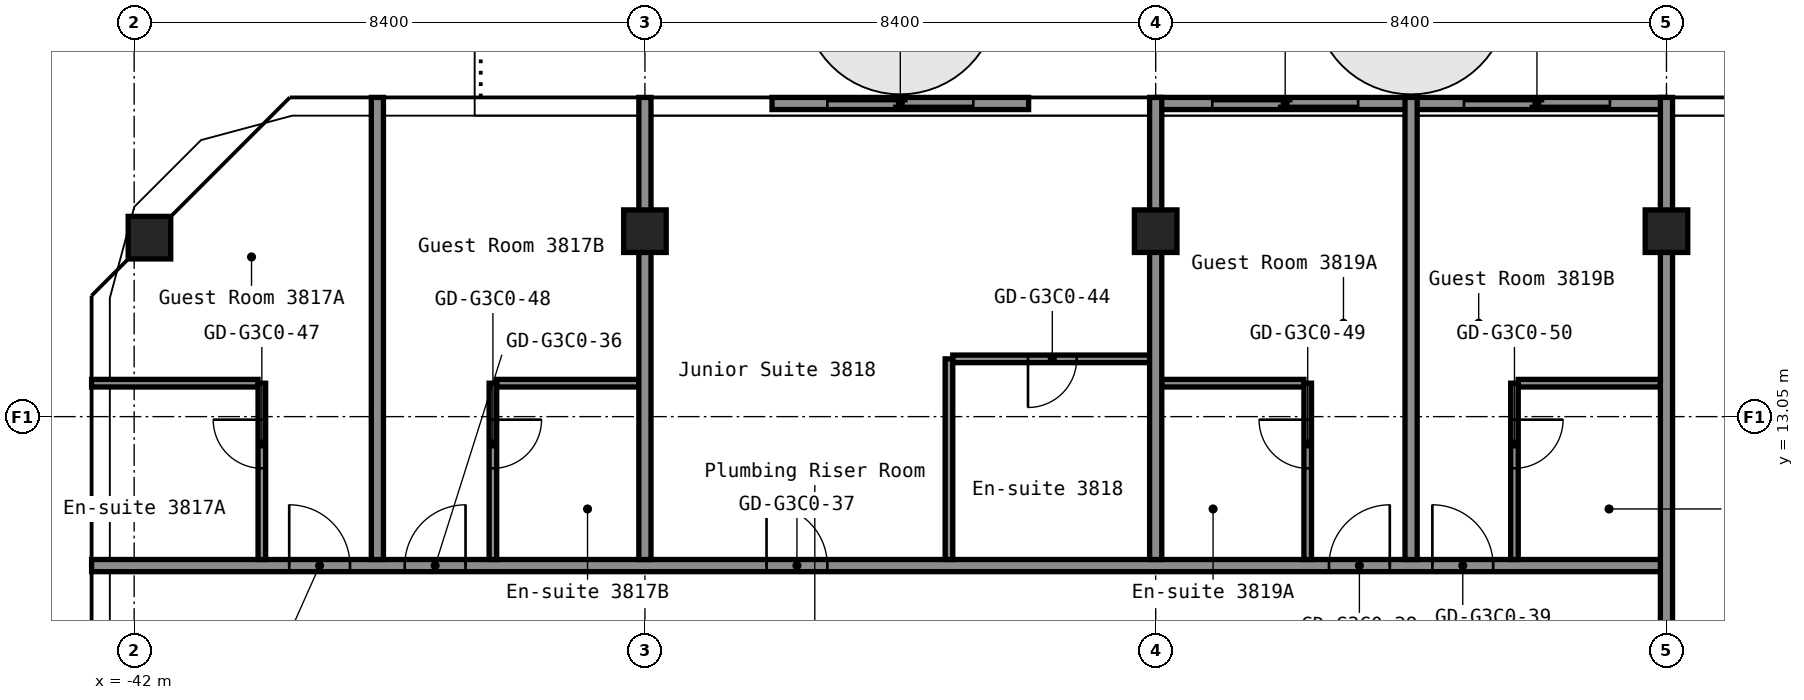
"""IFC4 building model, lengths in metres.
Left out: names, types, materials, properties, quantities, classifications, styles, units other than length and angle.
Written with IfcOpenShell. Run it as: python <this file> out.ifc"""

import sys

from ifc_helpers import new_model, si_unit, direction, frame, frame_2d, origin, origin_2d, place, context, subcontext, project, spatial, rectangle, hollow_rectangle, extrude, element, fill, save


model = new_model("IFC4")
c1 = context("Model", 3, precision=1e-05, world=origin(), true_north=direction((0.0, 1.0)))
c2 = subcontext(c1, "Body", "Model", "MODEL_VIEW")
j1 = project(units=[si_unit("LENGTHUNIT", "METRE"), si_unit("PLANEANGLEUNIT", "RADIAN")], contexts=[c1])
p1 = place(None, origin())
s1 = spatial("IfcSite", under=j1, at=p1, CompositionType="ELEMENT")
p2 = place(p1, origin())
s2 = spatial("IfcBuilding", under=s1, at=p2, CompositionType="ELEMENT")
p3 = place(p2, frame((0.0, 0.0, 137.4)))
s3 = spatial("IfcBuildingStorey", under=s2, at=p3, CompositionType="ELEMENT", Elevation=137.4)
for number, where, z_axis, x_axis in (
    (1, (-41.749, 15.994, 0.0), (0.0, 0.0, 1.0), (1.0, 0.0, 0.0)),
    (2, (-33.6, 16.1, 0.0), (0.0, 0.0, 1.0), (1.0, 0.0, 0.0)),
    (3, (-25.2, 16.1, 0.0), (0.0, 0.0, 1.0), (1.0, 0.0, 0.0)),
    (4, (-16.8, 16.1, 0.0), (0.0, 0.0, 1.0), (1.0, 0.0, 0.0)),
):
    element("IfcColumn", number, at=place(p3, frame(where, z_axis=z_axis, x_axis=x_axis)), inside=s3, PredefinedType="COLUMN", context=c2, shape_type="SweptSolid", body=[
        extrude(hollow_rectangle(XDim=0.7, YDim=0.7, WallThickness=0.028, at=origin_2d()), origin(), (0.0, 0.0, 1.0), 2.75),
    ])
p4 = place(p3, frame((-42.7, 10.6, 0.0), z_axis=(0.0, 0.0, 1.0), x_axis=(1.0, 0.0, 0.0)))
e5 = element("IfcWall", 5, at=p4, inside=s3, PredefinedType="PARTITIONING", context=c2, shape_type="SweptSolid", body=[
    extrude(rectangle(XDim=25.9, YDim=0.2, at=frame_2d((12.95, 0.0))), origin(), (0.0, 0.0, 1.0), 2.75),
])
p5 = place(p4, frame((3.25, 0.0, 0.0)))
e6 = element("IfcOpeningElement", 6, at=p5, cuts=e5, PredefinedType="OPENING", context=c2, shape_type="SweptSolid", body=[
    extrude(rectangle(XDim=1.0, YDim=2.1, at=frame_2d((0.5, 1.05))), frame((0.0, 0.11, 0.0), z_axis=(0.0, -1.0, 0.0), x_axis=(1.0, 0.0, 0.0)), (0.0, 0.0, 1.0), 0.22),
])
p6 = place(p4, frame((5.15, 0.0, 0.0)))
e7 = element("IfcOpeningElement", 7, at=p6, cuts=e5, PredefinedType="OPENING", context=c2, shape_type="SweptSolid", body=[
    extrude(rectangle(XDim=1.0, YDim=2.1, at=frame_2d((0.5, 1.05))), frame((0.0, 0.11, 0.0), z_axis=(0.0, -1.0, 0.0), x_axis=(1.0, 0.0, 0.0)), (0.0, 0.0, 1.0), 0.22),
])
p7 = place(p4, frame((11.1, 0.0, 0.0)))
e8 = element("IfcOpeningElement", 8, at=p7, cuts=e5, PredefinedType="OPENING", context=c2, shape_type="SweptSolid", body=[
    extrude(rectangle(XDim=1.0, YDim=2.1, at=frame_2d((0.5, 1.05))), frame((0.0, 0.11, 0.0), z_axis=(0.0, -1.0, 0.0), x_axis=(1.0, 0.0, 0.0)), (0.0, 0.0, 1.0), 0.22),
])
p8 = place(p4, frame((20.35, 0.0, 0.0)))
e9 = element("IfcOpeningElement", 9, at=p8, cuts=e5, PredefinedType="OPENING", context=c2, shape_type="SweptSolid", body=[
    extrude(rectangle(XDim=1.0, YDim=2.1, at=frame_2d((0.5, 1.05))), frame((0.0, 0.11, 0.0), z_axis=(0.0, -1.0, 0.0), x_axis=(1.0, 0.0, 0.0)), (0.0, 0.0, 1.0), 0.22),
])
p9 = place(p4, frame((22.05, 0.0, 0.0)))
e10 = element("IfcOpeningElement", 10, at=p9, cuts=e5, PredefinedType="OPENING", context=c2, shape_type="SweptSolid", body=[
    extrude(rectangle(XDim=1.0, YDim=2.1, at=frame_2d((0.5, 1.05))), frame((0.0, 0.11, 0.0), z_axis=(0.0, -1.0, 0.0), x_axis=(1.0, 0.0, 0.0)), (0.0, 0.0, 1.0), 0.22),
])
p10 = place(p3, frame((-42.7, 13.6, 0.0), z_axis=(0.0, 0.0, 1.0), x_axis=(1.0, 0.0, 0.0)))
e11 = element("IfcWall", 11, at=p10, inside=s3, PredefinedType="PARTITIONING", context=c2, shape_type="SweptSolid", body=[
    extrude(rectangle(XDim=2.738, YDim=0.125, at=frame_2d((1.369, 0.0))), origin(), (0.0, 0.0, 1.0), 2.75),
])
for number, where, z_axis, x_axis in (
    (12, (-36.038, 13.6, 0.0), (0.0, 0.0, 1.0), (1.0, 0.0, 0.0)),
    (13, (-25.1, 13.6, 0.0), (0.0, 0.0, 1.0), (1.0, 0.0, 0.0)),
    (14, (-19.238, 13.6, 0.0), (0.0, 0.0, 1.0), (1.0, 0.0, 0.0)),
):
    element("IfcWall", number, at=place(p3, frame(where, z_axis=z_axis, x_axis=x_axis)), inside=s3, PredefinedType="PARTITIONING", context=c2, shape_type="SweptSolid", body=[
        extrude(rectangle(XDim=2.338, YDim=0.125, at=frame_2d((1.169, 0.0))), origin(), (0.0, 0.0, 1.0), 2.75),
    ])
p11 = place(p3, frame((-28.538, 14.0, 0.0), z_axis=(0.0, 0.0, 1.0), x_axis=(1.0, 0.0, 0.0)))
e15 = element("IfcWall", 15, at=p11, inside=s3, PredefinedType="PARTITIONING", context=c2, shape_type="SweptSolid", body=[
    extrude(rectangle(XDim=3.238, YDim=0.125, at=frame_2d((1.619, 0.0))), origin(), (0.0, 0.0, 1.0), 2.75),
])
p12 = place(p11, frame((1.238, 0.0, 0.0)))
e16 = element("IfcOpeningElement", 16, at=p12, cuts=e15, PredefinedType="OPENING", context=c2, shape_type="SweptSolid", body=[
    extrude(rectangle(XDim=0.8, YDim=2.1, at=frame_2d((0.4, 1.05))), frame((0.0, 0.073, 0.0), z_axis=(0.0, -1.0, 0.0), x_axis=(1.0, 0.0, 0.0)), (0.0, 0.0, 1.0), 0.145),
])
p13 = place(p3, frame((-39.9, 10.7, 0.0), z_axis=(0.0, 0.0, 1.0), x_axis=(0.0, 1.0, 0.0)))
e17 = element("IfcWall", 17, at=p13, inside=s3, PredefinedType="PARTITIONING", context=c2, shape_type="SweptSolid", body=[
    extrude(rectangle(XDim=2.9, YDim=0.125, at=frame_2d((1.45, 0.0))), origin(), (0.0, 0.0, 1.0), 2.75),
])
p14 = place(p13, frame((1.5, 0.0, 0.0)))
e18 = element("IfcOpeningElement", 18, at=p14, cuts=e17, PredefinedType="OPENING", context=c2, shape_type="SweptSolid", body=[
    extrude(rectangle(XDim=0.8, YDim=2.1, at=frame_2d((0.4, 1.05))), frame((0.0, 0.073, 0.0), z_axis=(0.0, -1.0, 0.0), x_axis=(1.0, 0.0, 0.0)), (0.0, 0.0, 1.0), 0.145),
])
p15 = place(p3, frame((-38.0, 10.7, 0.0), z_axis=(0.0, 0.0, 1.0), x_axis=(0.0, 1.0, 0.0)))
e19 = element("IfcWall", 19, at=p15, inside=s3, PredefinedType="PARTITIONING", context=c2, shape_type="SweptSolid", body=[
    extrude(rectangle(XDim=7.6, YDim=0.2, at=frame_2d((3.8, 0.0))), origin(), (0.0, 0.0, 1.0), 2.75),
])
p16 = place(p3, frame((-36.1, 10.7, 0.0), z_axis=(0.0, 0.0, 1.0), x_axis=(0.0, 1.0, 0.0)))
e20 = element("IfcWall", 20, at=p16, inside=s3, PredefinedType="PARTITIONING", context=c2, shape_type="SweptSolid", body=[
    extrude(rectangle(XDim=2.9, YDim=0.125, at=frame_2d((1.45, 0.0))), origin(), (0.0, 0.0, 1.0), 2.75),
])
p17 = place(p16, frame((1.5, 0.0, 0.0)))
e21 = element("IfcOpeningElement", 21, at=p17, cuts=e20, PredefinedType="OPENING", context=c2, shape_type="SweptSolid", body=[
    extrude(rectangle(XDim=0.8, YDim=2.1, at=frame_2d((0.4, 1.05))), frame((0.0, 0.073, 0.0), z_axis=(0.0, -1.0, 0.0), x_axis=(1.0, 0.0, 0.0)), (0.0, 0.0, 1.0), 0.145),
])
p18 = place(p3, frame((-33.6, 10.7, 0.0), z_axis=(0.0, 0.0, 1.0), x_axis=(0.0, 1.0, 0.0)))
e22 = element("IfcWall", 22, at=p18, inside=s3, PredefinedType="PARTITIONING", context=c2, shape_type="SweptSolid", body=[
    extrude(rectangle(XDim=7.6, YDim=0.2, at=frame_2d((3.8, 0.0))), origin(), (0.0, 0.0, 1.0), 2.75),
])
p19 = place(p3, frame((-28.6, 10.7, 0.0), z_axis=(0.0, 0.0, 1.0), x_axis=(0.0, 1.0, 0.0)))
e23 = element("IfcWall", 23, at=p19, inside=s3, PredefinedType="PARTITIONING", context=c2, shape_type="SweptSolid", body=[
    extrude(rectangle(XDim=3.3, YDim=0.125, at=frame_2d((1.65, 0.0))), origin(), (0.0, 0.0, 1.0), 2.75),
])
p20 = place(p3, frame((-25.2, 10.7, 0.0), z_axis=(0.0, 0.0, 1.0), x_axis=(0.0, 1.0, 0.0)))
e24 = element("IfcWall", 24, at=p20, inside=s3, PredefinedType="PARTITIONING", context=c2, shape_type="SweptSolid", body=[
    extrude(rectangle(XDim=7.6, YDim=0.2, at=frame_2d((3.8, 0.0))), origin(), (0.0, 0.0, 1.0), 2.75),
])
p21 = place(p3, frame((-22.7, 10.7, 0.0), z_axis=(0.0, 0.0, 1.0), x_axis=(0.0, 1.0, 0.0)))
e25 = element("IfcWall", 25, at=p21, inside=s3, PredefinedType="PARTITIONING", context=c2, shape_type="SweptSolid", body=[
    extrude(rectangle(XDim=2.9, YDim=0.125, at=frame_2d((1.45, 0.0))), origin(), (0.0, 0.0, 1.0), 2.75),
])
p22 = place(p21, frame((1.5, 0.0, 0.0)))
e26 = element("IfcOpeningElement", 26, at=p22, cuts=e25, PredefinedType="OPENING", context=c2, shape_type="SweptSolid", body=[
    extrude(rectangle(XDim=0.8, YDim=2.1, at=frame_2d((0.4, 1.05))), frame((0.0, 0.073, 0.0), z_axis=(0.0, -1.0, 0.0), x_axis=(1.0, 0.0, 0.0)), (0.0, 0.0, 1.0), 0.145),
])
p23 = place(p3, frame((-21.0, 10.7, 0.0), z_axis=(0.0, 0.0, 1.0), x_axis=(0.0, 1.0, 0.0)))
e27 = element("IfcWall", 27, at=p23, inside=s3, PredefinedType="PARTITIONING", context=c2, shape_type="SweptSolid", body=[
    extrude(rectangle(XDim=7.6, YDim=0.2, at=frame_2d((3.8, 0.0))), origin(), (0.0, 0.0, 1.0), 2.75),
])
p24 = place(p3, frame((-19.3, 10.7, 0.0), z_axis=(0.0, 0.0, 1.0), x_axis=(0.0, 1.0, 0.0)))
e28 = element("IfcWall", 28, at=p24, inside=s3, PredefinedType="PARTITIONING", context=c2, shape_type="SweptSolid", body=[
    extrude(rectangle(XDim=2.9, YDim=0.125, at=frame_2d((1.45, 0.0))), origin(), (0.0, 0.0, 1.0), 2.75),
])
p25 = place(p24, frame((1.5, 0.0, 0.0)))
e29 = element("IfcOpeningElement", 29, at=p25, cuts=e28, PredefinedType="OPENING", context=c2, shape_type="SweptSolid", body=[
    extrude(rectangle(XDim=0.8, YDim=2.1, at=frame_2d((0.4, 1.05))), frame((0.0, 0.073, 0.0), z_axis=(0.0, -1.0, 0.0), x_axis=(1.0, 0.0, 0.0)), (0.0, 0.0, 1.0), 0.145),
])
p26 = place(p3, frame((-16.8, 8.39, 0.0), z_axis=(0.0, 0.0, 1.0), x_axis=(0.0, 1.0, 0.0)))
e30 = element("IfcWall", 30, at=p26, inside=s3, PredefinedType="PARTITIONING", context=c2, shape_type="SweptSolid", body=[
    extrude(rectangle(XDim=9.91, YDim=0.2, at=frame_2d((4.955, 0.0))), origin(), (0.0, 0.0, 1.0), 2.75),
])
p27 = place(p3, frame((-16.82, 18.2, 0.0), z_axis=(0.0, 0.0, 1.0), x_axis=(-1.0, 0.0, 0.0)))
p28 = place(p27, frame((0.91, 0.0, 0.0)))
p29 = place(p28, frame((2.4, 0.0, 0.0), z_axis=(0.0, 0.0, 1.0), x_axis=(-1.0, 0.0, 0.0)))
e31 = element("IfcDoor", 31, at=p29, inside=s3, OperationType="SLIDING_TO_LEFT", PredefinedType="DOOR", context=c2, shape_type="SweptSolid", body=[
    extrude(rectangle(XDim=2.4, YDim=2.2, at=frame_2d((1.2, 1.1))), frame((0.0, 0.025, 0.0), z_axis=(0.0, -1.0, 0.0), x_axis=(1.0, 0.0, 0.0)), (0.0, 0.0, 1.0), 0.05),
])
p30 = place(p3, frame((-20.96, 18.2, 0.0), z_axis=(0.0, 0.0, 1.0), x_axis=(-1.0, 0.0, 0.0)))
p31 = place(p30, frame((0.91, 0.0, 0.0)))
p32 = place(p31, frame((2.4, 0.0, 0.0), z_axis=(0.0, 0.0, 1.0), x_axis=(-1.0, 0.0, 0.0)))
e32 = element("IfcDoor", 32, at=p32, inside=s3, OperationType="SLIDING_TO_LEFT", PredefinedType="DOOR", context=c2, shape_type="SweptSolid", body=[
    extrude(rectangle(XDim=2.4, YDim=2.2, at=frame_2d((1.2, 1.1))), frame((0.0, 0.025, 0.0), z_axis=(0.0, -1.0, 0.0), x_axis=(1.0, 0.0, 0.0)), (0.0, 0.0, 1.0), 0.05),
])
p33 = place(p3, frame((-27.29, 18.2, 0.0), z_axis=(0.0, 0.0, 1.0), x_axis=(-1.0, 0.0, 0.0)))
p34 = place(p33, frame((0.91, 0.0, 0.0)))
p35 = place(p34, frame((2.4, 0.0, 0.0), z_axis=(0.0, 0.0, 1.0), x_axis=(-1.0, 0.0, 0.0)))
e33 = element("IfcDoor", 33, at=p35, inside=s3, OperationType="SLIDING_TO_LEFT", PredefinedType="DOOR", context=c2, shape_type="SweptSolid", body=[
    extrude(rectangle(XDim=2.4, YDim=2.2, at=frame_2d((1.2, 1.1))), frame((0.0, 0.025, 0.0), z_axis=(0.0, -1.0, 0.0), x_axis=(1.0, 0.0, 0.0)), (0.0, 0.0, 1.0), 0.05),
])
p36 = place(p5, origin())
e34 = element("IfcDoor", 34, at=p36, inside=s3, OperationType="SINGLE_SWING_RIGHT", PredefinedType="DOOR", context=c2, shape_type="SweptSolid", body=[
    extrude(rectangle(XDim=1.0, YDim=2.1, at=frame_2d((0.5, 1.05))), frame((0.0, 0.025, 0.0), z_axis=(0.0, -1.0, 0.0), x_axis=(1.0, 0.0, 0.0)), (0.0, 0.0, 1.0), 0.05),
])
fill(e6, e34)
p37 = place(p6, origin())
e35 = element("IfcDoor", 35, at=p37, inside=s3, OperationType="SINGLE_SWING_LEFT", PredefinedType="DOOR", context=c2, shape_type="SweptSolid", body=[
    extrude(rectangle(XDim=1.0, YDim=2.1, at=frame_2d((0.5, 1.05))), frame((0.0, 0.025, 0.0), z_axis=(0.0, -1.0, 0.0), x_axis=(1.0, 0.0, 0.0)), (0.0, 0.0, 1.0), 0.05),
])
fill(e7, e35)
p38 = place(p7, origin())
e36 = element("IfcDoor", 36, at=p38, inside=s3, OperationType="SINGLE_SWING_RIGHT", PredefinedType="DOOR", context=c2, shape_type="SweptSolid", body=[
    extrude(rectangle(XDim=1.0, YDim=2.1, at=frame_2d((0.5, 1.05))), frame((0.0, 0.025, 0.0), z_axis=(0.0, -1.0, 0.0), x_axis=(1.0, 0.0, 0.0)), (0.0, 0.0, 1.0), 0.05),
])
fill(e8, e36)
p39 = place(p8, origin())
e37 = element("IfcDoor", 37, at=p39, inside=s3, OperationType="SINGLE_SWING_LEFT", PredefinedType="DOOR", context=c2, shape_type="SweptSolid", body=[
    extrude(rectangle(XDim=1.0, YDim=2.1, at=frame_2d((0.5, 1.05))), frame((0.0, 0.025, 0.0), z_axis=(0.0, -1.0, 0.0), x_axis=(1.0, 0.0, 0.0)), (0.0, 0.0, 1.0), 0.05),
])
fill(e9, e37)
p40 = place(p9, origin())
e38 = element("IfcDoor", 38, at=p40, inside=s3, OperationType="SINGLE_SWING_RIGHT", PredefinedType="DOOR", context=c2, shape_type="SweptSolid", body=[
    extrude(rectangle(XDim=1.0, YDim=2.1, at=frame_2d((0.5, 1.05))), frame((0.0, 0.025, 0.0), z_axis=(0.0, -1.0, 0.0), x_axis=(1.0, 0.0, 0.0)), (0.0, 0.0, 1.0), 0.05),
])
fill(e10, e38)
p41 = place(p12, origin())
e39 = element("IfcDoor", 39, at=p41, inside=s3, OperationType="SINGLE_SWING_LEFT", PredefinedType="DOOR", context=c2, shape_type="SweptSolid", body=[
    extrude(rectangle(XDim=0.8, YDim=2.1, at=frame_2d((0.4, 1.05))), frame((0.0, 0.025, 0.0), z_axis=(0.0, -1.0, 0.0), x_axis=(1.0, 0.0, 0.0)), (0.0, 0.0, 1.0), 0.05),
])
fill(e16, e39)
p42 = place(p14, origin())
e40 = element("IfcDoor", 40, at=p42, inside=s3, OperationType="SINGLE_SWING_LEFT", PredefinedType="DOOR", context=c2, shape_type="SweptSolid", body=[
    extrude(rectangle(XDim=0.8, YDim=2.1, at=frame_2d((0.4, 1.05))), frame((0.0, 0.025, 0.0), z_axis=(0.0, -1.0, 0.0), x_axis=(1.0, 0.0, 0.0)), (0.0, 0.0, 1.0), 0.05),
])
fill(e18, e40)
p43 = place(p17, origin())
e41 = element("IfcDoor", 41, at=p43, inside=s3, OperationType="SINGLE_SWING_RIGHT", PredefinedType="DOOR", context=c2, shape_type="SweptSolid", body=[
    extrude(rectangle(XDim=0.8, YDim=2.1, at=frame_2d((0.4, 1.05))), frame((0.0, 0.025, 0.0), z_axis=(0.0, -1.0, 0.0), x_axis=(1.0, 0.0, 0.0)), (0.0, 0.0, 1.0), 0.05),
])
fill(e21, e41)
p44 = place(p22, origin())
e42 = element("IfcDoor", 42, at=p44, inside=s3, OperationType="SINGLE_SWING_LEFT", PredefinedType="DOOR", context=c2, shape_type="SweptSolid", body=[
    extrude(rectangle(XDim=0.8, YDim=2.1, at=frame_2d((0.4, 1.05))), frame((0.0, 0.025, 0.0), z_axis=(0.0, -1.0, 0.0), x_axis=(1.0, 0.0, 0.0)), (0.0, 0.0, 1.0), 0.05),
])
fill(e26, e42)
p45 = place(p25, origin())
e43 = element("IfcDoor", 43, at=p45, inside=s3, OperationType="SINGLE_SWING_RIGHT", PredefinedType="DOOR", context=c2, shape_type="SweptSolid", body=[
    extrude(rectangle(XDim=0.8, YDim=2.1, at=frame_2d((0.4, 1.05))), frame((0.0, 0.025, 0.0), z_axis=(0.0, -1.0, 0.0), x_axis=(1.0, 0.0, 0.0)), (0.0, 0.0, 1.0), 0.05),
])
fill(e29, e43)
save(model, sys.argv[1])
